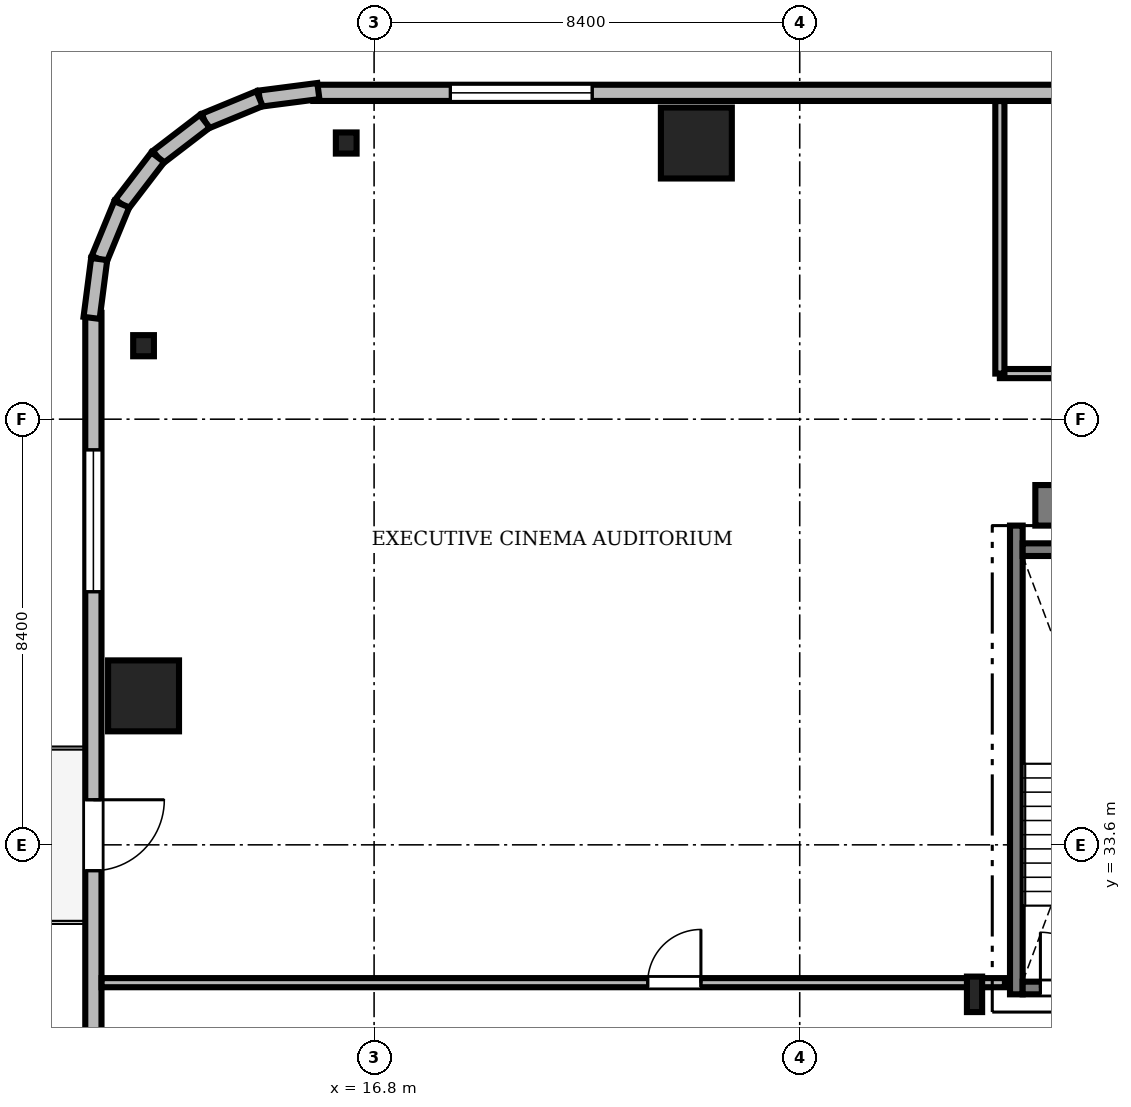
"""IFC4 building model, lengths in metres.
Left out: names, types, materials, properties, quantities, classifications, styles, units other than length and angle.
Written with IfcOpenShell. Run it as: python <this file> out.ifc"""

import sys

from ifc_helpers import new_model, si_unit, direction, frame, frame_2d, origin, origin_2d, place, context, subcontext, project, spatial, rectangle, i_section, extrude, source, transform, mapped, element, fill, save


model = new_model("IFC4")
c1 = context("Model", 3, precision=1e-05, world=origin(), true_north=direction((0.0, 1.0)))
c2 = subcontext(c1, "Body", "Model", "MODEL_VIEW")
j1 = project(units=[si_unit("LENGTHUNIT", "METRE"), si_unit("PLANEANGLEUNIT", "RADIAN")], contexts=[c1])
p1 = place(None, origin())
s1 = spatial("IfcSite", under=j1, at=p1, CompositionType="ELEMENT")
p2 = place(p1, origin())
s2 = spatial("IfcBuilding", under=s1, at=p2, CompositionType="ELEMENT")
p3 = place(p2, frame((0.0, 0.0, 211.05)))
s3 = spatial("IfcBuildingStorey", under=s2, at=p3, CompositionType="ELEMENT", Elevation=211.05)
m1 = source(origin(), c2, "Body", "SweptSolid", [
    extrude(rectangle(XDim=17.52, YDim=0.8, at=frame_2d((8.76, 0.0))), origin(), (0.0, 0.0, 1.0), 3.53),
])
p4 = place(p3, frame((29.85, 40.3, 0.0), z_axis=(0.0, 0.0, 1.0), x_axis=(1.0, 0.0, 0.0)))
e1 = element("IfcWall", 1, at=p4, inside=s3, PredefinedType="SHEAR", context=c2, shape_type="MappedRepresentation", body=[
    mapped(m1, transform((0.0, 0.0, 0.0), scale=1.0)),
])
m2 = source(origin(), c2, "Body", "SweptSolid", [
    extrude(i_section(OverallWidth=0.3, OverallDepth=0.7, WebThickness=0.017, FlangeThickness=0.032, FilletRadius=0.027, at=origin_2d()), origin(), (0.0, 0.0, 1.0), 3.53),
])
p5 = place(p3, frame((28.65, 30.65, 0.0), z_axis=(0.0, 0.0, 1.0), x_axis=(1.0, 0.0, 0.0)))
e2 = element("IfcColumn", 2, at=p5, inside=s3, PredefinedType="COLUMN", context=c2, shape_type="MappedRepresentation", body=[
    mapped(m2, transform((0.0, 0.0, 0.0), scale=1.0)),
])
m3 = source(origin(), c2, "Body", "SweptSolid", [
    extrude(rectangle(XDim=1.4, YDim=1.4, at=origin_2d()), origin(), (0.0, 0.0, 1.0), 3.53),
])
for number, where, z_axis, x_axis in (
    (3, (23.16, 47.45, 0.0), (0.0, 0.0, 1.0), (1.0, 0.0, 0.0)),
    (4, (12.25, 36.54, 0.0), (0.0, 0.0, 1.0), (1.0, 0.0, 0.0)),
):
    element("IfcColumn", number, at=place(p3, frame(where, z_axis=z_axis, x_axis=x_axis)), inside=s3, PredefinedType="COLUMN", context=c2, shape_type="MappedRepresentation", body=[
        mapped(m3, transform((0.0, 0.0, 0.0), scale=1.0)),
    ])
m4 = source(origin(), c2, "Body", "SweptSolid", [
    extrude(i_section(OverallWidth=0.409, OverallDepth=0.417, WebThickness=0.021, FlangeThickness=0.033, FilletRadius=0.015, at=origin_2d()), origin(), (0.0, 0.0, 1.0), 3.53),
])
for number, where, z_axis, x_axis in (
    (5, (16.25, 47.45, 0.0), (0.0, 0.0, 1.0), (1.0, 0.0, 0.0)),
    (6, (12.25, 43.45, 0.0), (0.0, 0.0, 1.0), (1.0, 0.0, 0.0)),
):
    element("IfcColumn", number, at=place(p3, frame(where, z_axis=z_axis, x_axis=x_axis)), inside=s3, PredefinedType="COLUMN", context=c2, shape_type="MappedRepresentation", body=[
        mapped(m4, transform((0.0, 0.0, 0.0), scale=1.0)),
    ])
m5 = source(origin(), c2, "Body", "SweptSolid", [
    extrude(rectangle(XDim=15.6, YDim=0.32, at=frame_2d((7.8, 0.0))), origin(), (0.0, 0.0, 1.0), 3.53),
])
p6 = place(p3, frame((31.2, 48.44, 0.0), z_axis=(0.0, 0.0, 1.0), x_axis=(-1.0, 0.0, 0.0)))
e7 = element("IfcWall", 7, at=p6, inside=s3, PredefinedType="SOLIDWALL", context=c2, shape_type="MappedRepresentation", body=[
    mapped(m5, transform((0.0, 0.0, 0.0), scale=1.0)),
])
m6 = source(origin(), c2, "Body", "SweptSolid", [
    extrude(rectangle(XDim=2.8, YDim=2.4, at=frame_2d((1.4, 1.2))), frame((0.0, 0.17, 0.0), z_axis=(0.0, -1.0, 0.0), x_axis=(1.0, 0.0, 0.0)), (0.0, 0.0, 1.0), 0.34),
])
p7 = place(p6, frame((10.095, 0.0, 0.72)))
e8 = element("IfcOpeningElement", 8, at=p7, cuts=e7, PredefinedType="OPENING", context=c2, shape_type="MappedRepresentation", body=[
    mapped(m6, transform((0.0, 0.0, 0.0), scale=1.0)),
])
m7 = source(origin(), c2, "Body", "SweptSolid", [
    extrude(rectangle(XDim=15.6, YDim=0.32, at=frame_2d((7.8, 0.0))), origin(), (0.0, 0.0, 1.0), 3.53),
])
p8 = place(p3, frame((11.26, 44.1, 0.0), z_axis=(0.0, 0.0, 1.0), x_axis=(0.0, -1.0, 0.0)))
e9 = element("IfcWall", 9, at=p8, inside=s3, PredefinedType="SOLIDWALL", context=c2, shape_type="MappedRepresentation", body=[
    mapped(m7, transform((0.0, 0.0, 0.0), scale=1.0)),
])
m8 = source(origin(), c2, "Body", "SweptSolid", [
    extrude(rectangle(XDim=1.4, YDim=2.3, at=frame_2d((0.7, 1.15))), frame((0.0, 0.17, 0.0), z_axis=(0.0, -1.0, 0.0), x_axis=(1.0, 0.0, 0.0)), (0.0, 0.0, 1.0), 0.34),
])
p9 = place(p8, frame((9.61, 0.0, 0.0)))
e10 = element("IfcOpeningElement", 10, at=p9, cuts=e9, PredefinedType="OPENING", context=c2, shape_type="MappedRepresentation", body=[
    mapped(m8, transform((0.0, 0.0, 0.0), scale=1.0)),
])
p10 = place(p8, frame((2.705, 0.0, 0.72)))
e11 = element("IfcOpeningElement", 11, at=p10, cuts=e9, PredefinedType="OPENING", context=c2, shape_type="MappedRepresentation", body=[
    mapped(m6, transform((0.0, 0.0, 0.0), scale=1.0)),
])
m9 = source(origin(), c2, "Body", "SweptSolid", [
    extrude(rectangle(XDim=1.17, YDim=0.32, at=frame_2d((0.585, 0.0))), origin(), (0.0, 0.0, 1.0), 3.53),
])
p11 = place(p3, frame((15.7, 48.476, 0.0), z_axis=(0.0, 0.0, 1.0), x_axis=(-0.991735963317, -0.128295670475, 0.0)))
e12 = element("IfcWall", 12, at=p11, inside=s3, PredefinedType="SOLIDWALL", context=c2, shape_type="MappedRepresentation", body=[
    mapped(m9, transform((0.0, 0.0, 0.0), scale=1.0)),
])
m10 = source(origin(), c2, "Body", "SweptSolid", [
    extrude(rectangle(XDim=1.169, YDim=0.32, at=frame_2d((0.584, 0.0))), origin(), (0.0, 0.0, 1.0), 3.53),
])
p12 = place(p3, frame((14.54, 48.325, 0.0), z_axis=(0.0, 0.0, 1.0), x_axis=(-0.924552646638, -0.381054331552, 0.0)))
e13 = element("IfcWall", 13, at=p12, inside=s3, PredefinedType="SOLIDWALL", context=c2, shape_type="MappedRepresentation", body=[
    mapped(m10, transform((0.0, 0.0, 0.0), scale=1.0)),
])
m11 = source(origin(), c2, "Body", "SweptSolid", [
    extrude(rectangle(XDim=1.169, YDim=0.32, at=frame_2d((0.584, 0.0))), origin(), (0.0, 0.0, 1.0), 3.53),
])
p13 = place(p3, frame((13.459, 47.88, 0.0), z_axis=(0.0, 0.0, 1.0), x_axis=(-0.793663520347, -0.608356981114, 0.0)))
e14 = element("IfcWall", 14, at=p13, inside=s3, PredefinedType="SOLIDWALL", context=c2, shape_type="MappedRepresentation", body=[
    mapped(m11, transform((0.0, 0.0, 0.0), scale=1.0)),
])
m12 = source(origin(), c2, "Body", "SweptSolid", [
    extrude(rectangle(XDim=1.169, YDim=0.32, at=frame_2d((0.584, 0.0))), origin(), (0.0, 0.0, 1.0), 3.53),
])
p14 = place(p3, frame((12.531, 47.169, 0.0), z_axis=(0.0, 0.0, 1.0), x_axis=(-0.608387696831, -0.793639975269, 0.0)))
e15 = element("IfcWall", 15, at=p14, inside=s3, PredefinedType="SOLIDWALL", context=c2, shape_type="MappedRepresentation", body=[
    mapped(m12, transform((0.0, 0.0, 0.0), scale=1.0)),
])
p15 = place(p3, frame((11.82, 46.241, 0.0), z_axis=(0.0, 0.0, 1.0), x_axis=(-0.381054331552, -0.924552646638, 0.0)))
e16 = element("IfcWall", 16, at=p15, inside=s3, PredefinedType="SOLIDWALL", context=c2, shape_type="MappedRepresentation", body=[
    mapped(m10, transform((0.0, 0.0, 0.0), scale=1.0)),
])
p16 = place(p3, frame((11.375, 45.16, 0.0), z_axis=(0.0, 0.0, 1.0), x_axis=(-0.128295670475, -0.991735963317, 0.0)))
e17 = element("IfcWall", 17, at=p16, inside=s3, PredefinedType="SOLIDWALL", context=c2, shape_type="MappedRepresentation", body=[
    mapped(m9, transform((0.0, 0.0, 0.0), scale=1.0)),
])
m13 = source(origin(), c2, "Body", "SweptSolid", [
    extrude(rectangle(XDim=9.25, YDim=0.25, at=frame_2d((4.625, 0.0))), origin(), (0.0, 0.0, 1.0), 3.55),
])
p17 = place(p3, frame((29.475, 30.65, 0.0), z_axis=(0.0, 0.0, 1.0), x_axis=(0.0, 1.0, 0.0)))
e18 = element("IfcWall", 18, at=p17, inside=s3, PredefinedType="SOLIDWALL", context=c2, shape_type="MappedRepresentation", body=[
    mapped(m13, transform((0.0, 0.0, 0.0), scale=1.0)),
])
m14 = source(origin(), c2, "Body", "SweptSolid", [
    extrude(rectangle(XDim=3.15, YDim=0.25, at=frame_2d((1.575, 0.0))), origin(), (0.0, 0.0, 1.0), 3.55),
])
p18 = place(p3, frame((29.6, 39.425, 0.0), z_axis=(0.0, 0.0, 1.0), x_axis=(1.0, 0.0, 0.0)))
e19 = element("IfcWall", 19, at=p18, inside=s3, PredefinedType="SOLIDWALL", context=c2, shape_type="MappedRepresentation", body=[
    mapped(m14, transform((0.0, 0.0, 0.0), scale=1.0)),
])
p19 = place(p3, frame((29.6, 30.775, 0.0), z_axis=(0.0, 0.0, 1.0), x_axis=(1.0, 0.0, 0.0)))
e20 = element("IfcWall", 20, at=p19, inside=s3, PredefinedType="SOLIDWALL", context=c2, shape_type="MappedRepresentation", body=[
    mapped(m14, transform((0.0, 0.0, 0.0), scale=1.0)),
])
m15 = source(origin(), c2, "Body", "SweptSolid", [
    extrude(rectangle(XDim=1.1, YDim=2.2, at=frame_2d((0.55, 1.1))), frame((0.0, 0.135, 0.0), z_axis=(0.0, -1.0, 0.0), x_axis=(1.0, 0.0, 0.0)), (0.0, 0.0, 1.0), 0.27),
])
p20 = place(p19, frame((0.35, 0.0, 0.0)))
e21 = element("IfcOpeningElement", 21, at=p20, cuts=e20, PredefinedType="OPENING", context=c2, shape_type="MappedRepresentation", body=[
    mapped(m15, transform((0.0, 0.0, 0.0), scale=1.0)),
])
m16 = source(origin(), c2, "Body", "SweptSolid", [
    extrude(rectangle(XDim=28.428, YDim=0.18, at=frame_2d((14.214, 0.0))), origin(), (0.0, 0.0, 1.0), 2.772),
])
p21 = place(p3, frame((29.15, 42.9, 0.0), z_axis=(0.0, 0.0, 1.0), x_axis=(1.0, 0.0, 0.0)))
e22 = element("IfcWall", 22, at=p21, inside=s3, PredefinedType="PARTITIONING", context=c2, shape_type="MappedRepresentation", body=[
    mapped(m16, transform((0.0, 0.0, 0.0), scale=1.0)),
])
m17 = source(origin(), c2, "Body", "SweptSolid", [
    extrude(rectangle(XDim=1.05, YDim=2.2, at=frame_2d((0.525, 1.1))), frame((0.0, 0.1, 0.0), z_axis=(0.0, -1.0, 0.0), x_axis=(1.0, 0.0, 0.0)), (0.0, 0.0, 1.0), 0.2),
])
p22 = place(p21, frame((4.5, 0.0, 0.0)))
e23 = element("IfcOpeningElement", 23, at=p22, cuts=e22, PredefinedType="OPENING", context=c2, shape_type="MappedRepresentation", body=[
    mapped(m17, transform((0.0, 0.0, 0.0), scale=1.0)),
])
m18 = source(origin(), c2, "Body", "SweptSolid", [
    extrude(rectangle(XDim=17.828, YDim=0.18, at=frame_2d((8.914, 0.0))), origin(), (0.0, 0.0, 1.0), 2.772),
])
p23 = place(p3, frame((11.422, 30.88, 0.0), z_axis=(0.0, 0.0, 1.0), x_axis=(1.0, 0.0, 0.0)))
e24 = element("IfcWall", 24, at=p23, inside=s3, PredefinedType="PARTITIONING", context=c2, shape_type="MappedRepresentation", body=[
    mapped(m18, transform((0.0, 0.0, 0.0), scale=1.0)),
])
p24 = place(p23, frame((10.778, 0.0, 0.0)))
e25 = element("IfcOpeningElement", 25, at=p24, cuts=e24, PredefinedType="OPENING", context=c2, shape_type="MappedRepresentation", body=[
    mapped(m17, transform((0.0, 0.0, 0.0), scale=1.0)),
])
m19 = source(origin(), c2, "Body", "SweptSolid", [
    extrude(rectangle(XDim=5.378, YDim=0.18, at=frame_2d((2.689, 0.0))), origin(), (0.0, 0.0, 1.0), 2.772),
])
p25 = place(p3, frame((29.15, 42.9, 0.0), z_axis=(0.0, 0.0, 1.0), x_axis=(0.0, 1.0, 0.0)))
e26 = element("IfcWall", 26, at=p25, inside=s3, PredefinedType="PARTITIONING", context=c2, shape_type="MappedRepresentation", body=[
    mapped(m19, transform((0.0, 0.0, 0.0), scale=1.0)),
])
m20 = source(origin(), c2, "Body", "SweptSolid", [
    extrude(rectangle(XDim=2.8, YDim=2.4, at=frame_2d((1.4, 1.2))), frame((0.0, 0.03, 0.0), z_axis=(0.0, -1.0, 0.0), x_axis=(1.0, 0.0, 0.0)), (0.0, 0.0, 1.0), 0.06),
])
p26 = place(p7, origin())
e27 = element("IfcWindow", 27, at=p26, inside=s3, PartitioningType="SINGLE_PANEL", PredefinedType="WINDOW", context=c2, shape_type="MappedRepresentation", body=[
    mapped(m20, transform((0.0, 0.0, 0.0), scale=1.0)),
])
fill(e8, e27)
m21 = source(origin(), c2, "Body", "SweptSolid", [
    extrude(rectangle(XDim=1.4, YDim=2.3, at=frame_2d((0.7, 1.15))), frame((0.0, 0.025, 0.0), z_axis=(0.0, -1.0, 0.0), x_axis=(1.0, 0.0, 0.0)), (0.0, 0.0, 1.0), 0.05),
])
p27 = place(p9, frame((1.4, 0.0, 0.0), z_axis=(0.0, 0.0, 1.0), x_axis=(-1.0, 0.0, 0.0)))
e28 = element("IfcDoor", 28, at=p27, inside=s3, OperationType="DOUBLE_DOOR_SLIDING", PredefinedType="DOOR", context=c2, shape_type="MappedRepresentation", body=[
    mapped(m21, transform((0.0, 0.0, 0.0), scale=1.0)),
])
fill(e10, e28)
p28 = place(p10, origin())
e29 = element("IfcWindow", 29, at=p28, inside=s3, PartitioningType="SINGLE_PANEL", PredefinedType="WINDOW", context=c2, shape_type="MappedRepresentation", body=[
    mapped(m20, transform((0.0, 0.0, 0.0), scale=1.0)),
])
fill(e11, e29)
m22 = source(origin(), c2, "Body", "SweptSolid", [
    extrude(rectangle(XDim=1.1, YDim=2.2, at=frame_2d((0.55, 1.1))), frame((0.0, 0.025, 0.0), z_axis=(0.0, -1.0, 0.0), x_axis=(1.0, 0.0, 0.0)), (0.0, 0.0, 1.0), 0.05),
])
p29 = place(p20, origin())
e30 = element("IfcDoor", 30, at=p29, inside=s3, OperationType="SINGLE_SWING_LEFT", PredefinedType="DOOR", context=c2, shape_type="MappedRepresentation", body=[
    mapped(m22, transform((0.0, 0.0, 0.0), scale=1.0)),
])
fill(e21, e30)
m23 = source(origin(), c2, "Body", "SweptSolid", [
    extrude(rectangle(XDim=1.05, YDim=2.2, at=frame_2d((0.525, 1.1))), frame((0.0, 0.025, 0.0), z_axis=(0.0, -1.0, 0.0), x_axis=(1.0, 0.0, 0.0)), (0.0, 0.0, 1.0), 0.05),
])
p30 = place(p24, origin())
e31 = element("IfcDoor", 31, at=p30, inside=s3, OperationType="SINGLE_SWING_RIGHT", PredefinedType="DOOR", context=c2, shape_type="MappedRepresentation", body=[
    mapped(m23, transform((0.0, 0.0, 0.0), scale=1.0)),
])
fill(e25, e31)
save(model, sys.argv[1])
